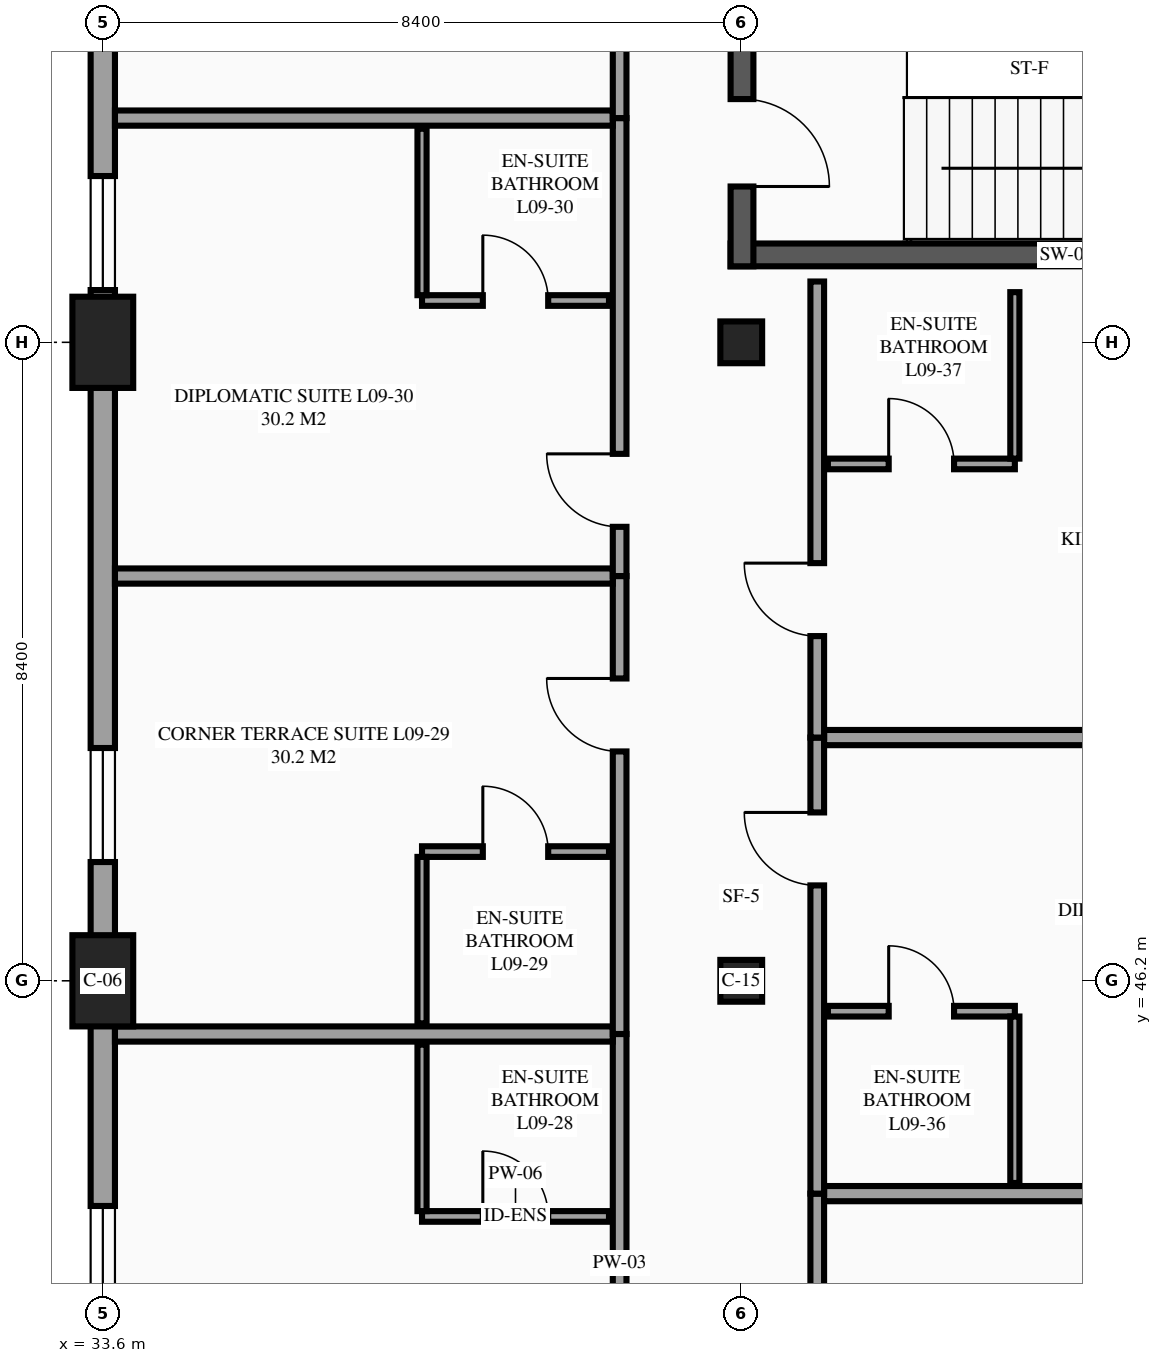
"""IFC4 building model, lengths in metres.
Left out: names, types, materials, properties, quantities, classifications, styles, units other than length and angle.
Written with IfcOpenShell. Run it as: python <this file> out.ifc"""

import sys

from ifc_helpers import new_model, si_unit, direction, frame, frame_2d, origin, origin_2d, place, context, subcontext, project, spatial, rectangle, extrude, element, fill, save


model = new_model("IFC4")
c1 = context("Model", 3, precision=1e-05, world=origin(), true_north=direction((0.0, 1.0)))
c2 = subcontext(c1, "Body", "Model", "MODEL_VIEW")
j1 = project(units=[si_unit("LENGTHUNIT", "METRE"), si_unit("PLANEANGLEUNIT", "RADIAN")], contexts=[c1])
p1 = place(None, origin())
s1 = spatial("IfcSite", under=j1, at=p1, CompositionType="ELEMENT")
p2 = place(p1, origin())
s2 = spatial("IfcBuilding", under=s1, at=p2, CompositionType="ELEMENT")
p3 = place(p2, frame((0.0, 0.0, 36.3)))
s3 = spatial("IfcBuildingStorey", under=s2, at=p3, CompositionType="ELEMENT", Elevation=36.3)
for number, where, z_axis, x_axis in (
    (1, (33.6, 46.2, 0.0), (0.0, 0.0, 1.0), (1.0, 0.0, 0.0)),
    (2, (33.6, 54.6, 0.0), (0.0, 0.0, 1.0), (1.0, 0.0, 0.0)),
):
    element("IfcColumn", number, at=place(p3, frame(where, z_axis=z_axis, x_axis=x_axis)), inside=s3, PredefinedType="COLUMN", context=c2, shape_type="SweptSolid", body=[
        extrude(rectangle(XDim=0.8, YDim=1.2, at=origin_2d()), origin(), (0.0, 0.0, 1.0), 3.6),
    ])
for number, where, z_axis, x_axis in (
    (3, (42.0, 46.2, 0.0), (0.0, 0.0, 1.0), (1.0, 0.0, 0.0)),
    (4, (42.0, 54.6, 0.0), (0.0, 0.0, 1.0), (1.0, 0.0, 0.0)),
):
    element("IfcColumn", number, at=place(p3, frame(where, z_axis=z_axis, x_axis=x_axis)), inside=s3, PredefinedType="COLUMN", context=c2, shape_type="SweptSolid", body=[
        extrude(rectangle(XDim=0.55, YDim=0.55, at=origin_2d()), origin(), (0.0, 0.0, 1.0), 3.6),
    ])
p4 = place(p3, frame((33.6, 63.0, 0.0), z_axis=(0.0, 0.0, 1.0), x_axis=(0.0, -1.0, 0.0)))
e5 = element("IfcWall", 5, at=p4, inside=s3, PredefinedType="STANDARD", context=c2, shape_type="SweptSolid", body=[
    extrude(rectangle(XDim=25.2, YDim=0.32, at=frame_2d((12.6, 0.0))), origin(), (0.0, 0.0, 1.0), 2.63),
])
p5 = place(p4, frame((19.762, 0.0, 0.85)))
e6 = element("IfcOpeningElement", 6, at=p5, cuts=e5, PredefinedType="OPENING", context=c2, shape_type="SweptSolid", body=[
    extrude(rectangle(XDim=1.5, YDim=1.5, at=frame_2d((0.75, 0.75))), frame((0.0, 0.17, 0.0), z_axis=(0.0, -1.0, 0.0), x_axis=(1.0, 0.0, 0.0)), (0.0, 0.0, 1.0), 0.34),
])
p6 = place(p4, frame((13.738, 0.0, 0.85)))
e7 = element("IfcOpeningElement", 7, at=p6, cuts=e5, PredefinedType="OPENING", context=c2, shape_type="SweptSolid", body=[
    extrude(rectangle(XDim=1.5, YDim=1.5, at=frame_2d((0.75, 0.75))), frame((0.0, 0.17, 0.0), z_axis=(0.0, -1.0, 0.0), x_axis=(1.0, 0.0, 0.0)), (0.0, 0.0, 1.0), 0.34),
])
p7 = place(p4, frame((6.212, 0.0, 0.85)))
e8 = element("IfcOpeningElement", 8, at=p7, cuts=e5, PredefinedType="OPENING", context=c2, shape_type="SweptSolid", body=[
    extrude(rectangle(XDim=1.5, YDim=1.5, at=frame_2d((0.75, 0.75))), frame((0.0, 0.17, 0.0), z_axis=(0.0, -1.0, 0.0), x_axis=(1.0, 0.0, 0.0)), (0.0, 0.0, 1.0), 0.34),
])
p8 = place(p4, frame((1.688, 0.0, 0.85)))
e9 = element("IfcOpeningElement", 9, at=p8, cuts=e5, PredefinedType="OPENING", context=c2, shape_type="SweptSolid", body=[
    extrude(rectangle(XDim=1.5, YDim=1.5, at=frame_2d((0.75, 0.75))), frame((0.0, 0.17, 0.0), z_axis=(0.0, -1.0, 0.0), x_axis=(1.0, 0.0, 0.0)), (0.0, 0.0, 1.0), 0.34),
])
p9 = place(p3, frame((41.86, 55.75, 0.0), z_axis=(0.0, 0.0, 1.0), x_axis=(1.0, 0.0, 0.0)))
e10 = element("IfcWall", 10, at=p9, inside=s3, PredefinedType="SHEAR", context=c2, shape_type="SweptSolid", body=[
    extrude(rectangle(XDim=8.84, YDim=0.3, at=frame_2d((4.42, 0.0))), origin(), (0.0, 0.0, 1.0), 3.6),
])
p10 = place(p3, frame((42.01, 60.8, 0.0), z_axis=(0.0, 0.0, 1.0), x_axis=(0.0, -1.0, 0.0)))
e11 = element("IfcWall", 11, at=p10, inside=s3, PredefinedType="SHEAR", context=c2, shape_type="SweptSolid", body=[
    extrude(rectangle(XDim=5.2, YDim=0.3, at=frame_2d((2.6, 0.0))), origin(), (0.0, 0.0, 1.0), 3.6),
])
p11 = place(p10, frame((3.0, 0.0, 0.0)))
e12 = element("IfcOpeningElement", 12, at=p11, cuts=e11, PredefinedType="OPENING", context=c2, shape_type="SweptSolid", body=[
    extrude(rectangle(XDim=1.15, YDim=2.15, at=frame_2d((0.575, 1.075))), frame((0.0, 0.16, 0.0), z_axis=(0.0, -1.0, 0.0), x_axis=(1.0, 0.0, 0.0)), (0.0, 0.0, 1.0), 0.32),
])
p12 = place(p3, frame((40.4, 39.475, 0.0), z_axis=(0.0, 0.0, 1.0), x_axis=(0.0, 1.0, 0.0)))
e13 = element("IfcWall", 13, at=p12, inside=s3, PredefinedType="PARTITIONING", context=c2, shape_type="SweptSolid", body=[
    extrude(rectangle(XDim=6.025, YDim=0.18, at=frame_2d((3.012, 0.0))), origin(), (0.0, 0.0, 1.0), 3.375),
])
p13 = place(p12, frame((1.347, 0.0, 0.0)))
e14 = element("IfcOpeningElement", 14, at=p13, cuts=e13, PredefinedType="OPENING", context=c2, shape_type="SweptSolid", body=[
    extrude(rectangle(XDim=0.96, YDim=2.15, at=frame_2d((0.48, 1.075))), frame((0.0, 0.1, 0.0), z_axis=(0.0, -1.0, 0.0), x_axis=(1.0, 0.0, 0.0)), (0.0, 0.0, 1.0), 0.2),
])
p14 = place(p3, frame((33.76, 45.5, 0.0), z_axis=(0.0, 0.0, 1.0), x_axis=(1.0, 0.0, 0.0)))
e15 = element("IfcWall", 15, at=p14, inside=s3, PredefinedType="PARTITIONING", context=c2, shape_type="SweptSolid", body=[
    extrude(rectangle(XDim=6.55, YDim=0.2, at=frame_2d((3.275, 0.0))), origin(), (0.0, 0.0, 1.0), 3.375),
])
p15 = place(p3, frame((37.8, 43.1, 0.0), z_axis=(0.0, 0.0, 1.0), x_axis=(1.0, 0.0, 0.0)))
e16 = element("IfcWall", 16, at=p15, inside=s3, PredefinedType="PARTITIONING", context=c2, shape_type="SweptSolid", body=[
    extrude(rectangle(XDim=2.46, YDim=0.14, at=frame_2d((1.23, 0.0))), origin(), (0.0, 0.0, 1.0), 3.375),
])
p16 = place(p15, frame((0.8, 0.0, 0.0)))
e17 = element("IfcOpeningElement", 17, at=p16, cuts=e16, PredefinedType="OPENING", context=c2, shape_type="SweptSolid", body=[
    extrude(rectangle(XDim=0.86, YDim=2.1, at=frame_2d((0.43, 1.05))), frame((0.0, 0.08, 0.0), z_axis=(0.0, -1.0, 0.0), x_axis=(1.0, 0.0, 0.0)), (0.0, 0.0, 1.0), 0.16),
])
p17 = place(p3, frame((37.8, 43.17, 0.0), z_axis=(0.0, 0.0, 1.0), x_axis=(0.0, 1.0, 0.0)))
e18 = element("IfcWall", 18, at=p17, inside=s3, PredefinedType="PARTITIONING", context=c2, shape_type="SweptSolid", body=[
    extrude(rectangle(XDim=2.19, YDim=0.12, at=frame_2d((1.095, 0.0))), origin(), (0.0, 0.0, 1.0), 3.375),
])
p18 = place(p3, frame((40.4, 45.5, 0.0), z_axis=(0.0, 0.0, 1.0), x_axis=(0.0, 1.0, 0.0)))
e19 = element("IfcWall", 19, at=p18, inside=s3, PredefinedType="PARTITIONING", context=c2, shape_type="SweptSolid", body=[
    extrude(rectangle(XDim=6.025, YDim=0.18, at=frame_2d((3.012, 0.0))), origin(), (0.0, 0.0, 1.0), 3.375),
])
p19 = place(p18, frame((3.718, 0.0, 0.0)))
e20 = element("IfcOpeningElement", 20, at=p19, cuts=e19, PredefinedType="OPENING", context=c2, shape_type="SweptSolid", body=[
    extrude(rectangle(XDim=0.96, YDim=2.15, at=frame_2d((0.48, 1.075))), frame((0.0, 0.1, 0.0), z_axis=(0.0, -1.0, 0.0), x_axis=(1.0, 0.0, 0.0)), (0.0, 0.0, 1.0), 0.2),
])
p20 = place(p3, frame((33.76, 51.525, 0.0), z_axis=(0.0, 0.0, 1.0), x_axis=(1.0, 0.0, 0.0)))
e21 = element("IfcWall", 21, at=p20, inside=s3, PredefinedType="PARTITIONING", context=c2, shape_type="SweptSolid", body=[
    extrude(rectangle(XDim=6.55, YDim=0.2, at=frame_2d((3.275, 0.0))), origin(), (0.0, 0.0, 1.0), 3.375),
])
p21 = place(p3, frame((37.8, 47.9, 0.0), z_axis=(0.0, 0.0, 1.0), x_axis=(1.0, 0.0, 0.0)))
e22 = element("IfcWall", 22, at=p21, inside=s3, PredefinedType="PARTITIONING", context=c2, shape_type="SweptSolid", body=[
    extrude(rectangle(XDim=2.46, YDim=0.14, at=frame_2d((1.23, 0.0))), origin(), (0.0, 0.0, 1.0), 3.375),
])
p22 = place(p21, frame((0.8, 0.0, 0.0)))
e23 = element("IfcOpeningElement", 23, at=p22, cuts=e22, PredefinedType="OPENING", context=c2, shape_type="SweptSolid", body=[
    extrude(rectangle(XDim=0.86, YDim=2.1, at=frame_2d((0.43, 1.05))), frame((0.0, 0.08, 0.0), z_axis=(0.0, -1.0, 0.0), x_axis=(1.0, 0.0, 0.0)), (0.0, 0.0, 1.0), 0.16),
])
p23 = place(p3, frame((37.8, 45.64, 0.0), z_axis=(0.0, 0.0, 1.0), x_axis=(0.0, 1.0, 0.0)))
e24 = element("IfcWall", 24, at=p23, inside=s3, PredefinedType="PARTITIONING", context=c2, shape_type="SweptSolid", body=[
    extrude(rectangle(XDim=2.19, YDim=0.12, at=frame_2d((1.095, 0.0))), origin(), (0.0, 0.0, 1.0), 3.375),
])
p24 = place(p3, frame((40.4, 51.525, 0.0), z_axis=(0.0, 0.0, 1.0), x_axis=(0.0, 1.0, 0.0)))
e25 = element("IfcWall", 25, at=p24, inside=s3, PredefinedType="PARTITIONING", context=c2, shape_type="SweptSolid", body=[
    extrude(rectangle(XDim=6.025, YDim=0.18, at=frame_2d((3.013, 0.0))), origin(), (0.0, 0.0, 1.0), 3.375),
])
p25 = place(p24, frame((0.647, 0.0, 0.0)))
e26 = element("IfcOpeningElement", 26, at=p25, cuts=e25, PredefinedType="OPENING", context=c2, shape_type="SweptSolid", body=[
    extrude(rectangle(XDim=0.96, YDim=2.15, at=frame_2d((0.48, 1.075))), frame((0.0, 0.1, 0.0), z_axis=(0.0, -1.0, 0.0), x_axis=(1.0, 0.0, 0.0)), (0.0, 0.0, 1.0), 0.2),
])
p26 = place(p3, frame((33.76, 57.55, 0.0), z_axis=(0.0, 0.0, 1.0), x_axis=(1.0, 0.0, 0.0)))
e27 = element("IfcWall", 27, at=p26, inside=s3, PredefinedType="PARTITIONING", context=c2, shape_type="SweptSolid", body=[
    extrude(rectangle(XDim=6.55, YDim=0.2, at=frame_2d((3.275, 0.0))), origin(), (0.0, 0.0, 1.0), 3.375),
])
p27 = place(p3, frame((37.8, 55.15, 0.0), z_axis=(0.0, 0.0, 1.0), x_axis=(1.0, 0.0, 0.0)))
e28 = element("IfcWall", 28, at=p27, inside=s3, PredefinedType="PARTITIONING", context=c2, shape_type="SweptSolid", body=[
    extrude(rectangle(XDim=2.46, YDim=0.14, at=frame_2d((1.23, 0.0))), origin(), (0.0, 0.0, 1.0), 3.375),
])
p28 = place(p27, frame((0.8, 0.0, 0.0)))
e29 = element("IfcOpeningElement", 29, at=p28, cuts=e28, PredefinedType="OPENING", context=c2, shape_type="SweptSolid", body=[
    extrude(rectangle(XDim=0.86, YDim=2.1, at=frame_2d((0.43, 1.05))), frame((0.0, 0.08, 0.0), z_axis=(0.0, -1.0, 0.0), x_axis=(1.0, 0.0, 0.0)), (0.0, 0.0, 1.0), 0.16),
])
p29 = place(p3, frame((37.8, 55.22, 0.0), z_axis=(0.0, 0.0, 1.0), x_axis=(0.0, 1.0, 0.0)))
e30 = element("IfcWall", 30, at=p29, inside=s3, PredefinedType="PARTITIONING", context=c2, shape_type="SweptSolid", body=[
    extrude(rectangle(XDim=2.19, YDim=0.12, at=frame_2d((1.095, 0.0))), origin(), (0.0, 0.0, 1.0), 3.375),
])
p30 = place(p3, frame((40.4, 57.55, 0.0), z_axis=(0.0, 0.0, 1.0), x_axis=(0.0, 1.0, 0.0)))
e31 = element("IfcWall", 31, at=p30, inside=s3, PredefinedType="PARTITIONING", context=c2, shape_type="SweptSolid", body=[
    extrude(rectangle(XDim=6.025, YDim=0.18, at=frame_2d((3.012, 0.0))), origin(), (0.0, 0.0, 1.0), 3.375),
])
p31 = place(p30, frame((1.347, 0.0, 0.0)))
e32 = element("IfcOpeningElement", 32, at=p31, cuts=e31, PredefinedType="OPENING", context=c2, shape_type="SweptSolid", body=[
    extrude(rectangle(XDim=0.96, YDim=2.15, at=frame_2d((0.48, 1.075))), frame((0.0, 0.1, 0.0), z_axis=(0.0, -1.0, 0.0), x_axis=(1.0, 0.0, 0.0)), (0.0, 0.0, 1.0), 0.2),
])
p32 = place(p3, frame((43.0, 37.4, 0.0), z_axis=(0.0, 0.0, 1.0), x_axis=(0.0, 1.0, 0.0)))
e33 = element("IfcWall", 33, at=p32, inside=s3, PredefinedType="PARTITIONING", context=c2, shape_type="SweptSolid", body=[
    extrude(rectangle(XDim=6.0, YDim=0.18, at=frame_2d((3.0, 0.0))), origin(), (0.0, 0.0, 1.0), 3.375),
])
p33 = place(p32, frame((3.705, 0.0, 0.0)))
e34 = element("IfcOpeningElement", 34, at=p33, cuts=e33, PredefinedType="OPENING", context=c2, shape_type="SweptSolid", body=[
    extrude(rectangle(XDim=0.96, YDim=2.15, at=frame_2d((0.48, 1.075))), frame((0.0, 0.1, 0.0), z_axis=(0.0, -1.0, 0.0), x_axis=(1.0, 0.0, 0.0)), (0.0, 0.0, 1.0), 0.2),
])
p34 = place(p3, frame((43.09, 43.4, 0.0), z_axis=(0.0, 0.0, 1.0), x_axis=(1.0, 0.0, 0.0)))
e35 = element("IfcWall", 35, at=p34, inside=s3, PredefinedType="PARTITIONING", context=c2, shape_type="SweptSolid", body=[
    extrude(rectangle(XDim=7.15, YDim=0.2, at=frame_2d((3.575, 0.0))), origin(), (0.0, 0.0, 1.0), 3.375),
])
p35 = place(p3, frame((43.0, 43.4, 0.0), z_axis=(0.0, 0.0, 1.0), x_axis=(0.0, 1.0, 0.0)))
e36 = element("IfcWall", 36, at=p35, inside=s3, PredefinedType="PARTITIONING", context=c2, shape_type="SweptSolid", body=[
    extrude(rectangle(XDim=6.0, YDim=0.18, at=frame_2d((3.0, 0.0))), origin(), (0.0, 0.0, 1.0), 3.375),
])
p36 = place(p35, frame((4.055, 0.0, 0.0)))
e37 = element("IfcOpeningElement", 37, at=p36, cuts=e36, PredefinedType="OPENING", context=c2, shape_type="SweptSolid", body=[
    extrude(rectangle(XDim=0.96, YDim=2.15, at=frame_2d((0.48, 1.075))), frame((0.0, 0.1, 0.0), z_axis=(0.0, -1.0, 0.0), x_axis=(1.0, 0.0, 0.0)), (0.0, 0.0, 1.0), 0.2),
])
p37 = place(p3, frame((43.09, 49.4, 0.0), z_axis=(0.0, 0.0, 1.0), x_axis=(1.0, 0.0, 0.0)))
e38 = element("IfcWall", 38, at=p37, inside=s3, PredefinedType="PARTITIONING", context=c2, shape_type="SweptSolid", body=[
    extrude(rectangle(XDim=7.15, YDim=0.2, at=frame_2d((3.575, 0.0))), origin(), (0.0, 0.0, 1.0), 3.375),
])
p38 = place(p3, frame((43.14, 45.8, 0.0), z_axis=(0.0, 0.0, 1.0), x_axis=(1.0, 0.0, 0.0)))
e39 = element("IfcWall", 39, at=p38, inside=s3, PredefinedType="PARTITIONING", context=c2, shape_type="SweptSolid", body=[
    extrude(rectangle(XDim=2.46, YDim=0.14, at=frame_2d((1.23, 0.0))), origin(), (0.0, 0.0, 1.0), 3.375),
])
p39 = place(p38, frame((0.8, 0.0, 0.0)))
e40 = element("IfcOpeningElement", 40, at=p39, cuts=e39, PredefinedType="OPENING", context=c2, shape_type="SweptSolid", body=[
    extrude(rectangle(XDim=0.86, YDim=2.1, at=frame_2d((0.43, 1.05))), frame((0.0, 0.08, 0.0), z_axis=(0.0, -1.0, 0.0), x_axis=(1.0, 0.0, 0.0)), (0.0, 0.0, 1.0), 0.16),
])
p40 = place(p3, frame((45.6, 43.54, 0.0), z_axis=(0.0, 0.0, 1.0), x_axis=(0.0, 1.0, 0.0)))
e41 = element("IfcWall", 41, at=p40, inside=s3, PredefinedType="PARTITIONING", context=c2, shape_type="SweptSolid", body=[
    extrude(rectangle(XDim=2.19, YDim=0.12, at=frame_2d((1.095, 0.0))), origin(), (0.0, 0.0, 1.0), 3.375),
])
p41 = place(p3, frame((43.0, 49.4, 0.0), z_axis=(0.0, 0.0, 1.0), x_axis=(0.0, 1.0, 0.0)))
e42 = element("IfcWall", 42, at=p41, inside=s3, PredefinedType="PARTITIONING", context=c2, shape_type="SweptSolid", body=[
    extrude(rectangle(XDim=6.0, YDim=0.18, at=frame_2d((3.0, 0.0))), origin(), (0.0, 0.0, 1.0), 3.375),
])
p42 = place(p41, frame((1.335, 0.0, 0.0)))
e43 = element("IfcOpeningElement", 43, at=p42, cuts=e42, PredefinedType="OPENING", context=c2, shape_type="SweptSolid", body=[
    extrude(rectangle(XDim=0.96, YDim=2.15, at=frame_2d((0.48, 1.075))), frame((0.0, 0.1, 0.0), z_axis=(0.0, -1.0, 0.0), x_axis=(1.0, 0.0, 0.0)), (0.0, 0.0, 1.0), 0.2),
])
p43 = place(p3, frame((43.14, 53.0, 0.0), z_axis=(0.0, 0.0, 1.0), x_axis=(1.0, 0.0, 0.0)))
e44 = element("IfcWall", 44, at=p43, inside=s3, PredefinedType="PARTITIONING", context=c2, shape_type="SweptSolid", body=[
    extrude(rectangle(XDim=2.46, YDim=0.14, at=frame_2d((1.23, 0.0))), origin(), (0.0, 0.0, 1.0), 3.375),
])
p44 = place(p43, frame((0.8, 0.0, 0.0)))
e45 = element("IfcOpeningElement", 45, at=p44, cuts=e44, PredefinedType="OPENING", context=c2, shape_type="SweptSolid", body=[
    extrude(rectangle(XDim=0.86, YDim=2.1, at=frame_2d((0.43, 1.05))), frame((0.0, 0.08, 0.0), z_axis=(0.0, -1.0, 0.0), x_axis=(1.0, 0.0, 0.0)), (0.0, 0.0, 1.0), 0.16),
])
p45 = place(p3, frame((45.6, 53.07, 0.0), z_axis=(0.0, 0.0, 1.0), x_axis=(0.0, 1.0, 0.0)))
e46 = element("IfcWall", 46, at=p45, inside=s3, PredefinedType="PARTITIONING", context=c2, shape_type="SweptSolid", body=[
    extrude(rectangle(XDim=2.19, YDim=0.12, at=frame_2d((1.095, 0.0))), origin(), (0.0, 0.0, 1.0), 3.375),
])
p46 = place(p5, origin())
e47 = element("IfcWindow", 47, at=p46, inside=s3, PartitioningType="SINGLE_PANEL", PredefinedType="WINDOW", context=c2, shape_type="SweptSolid", body=[
    extrude(rectangle(XDim=1.5, YDim=1.5, at=frame_2d((0.75, 0.75))), frame((0.0, 0.03, 0.0), z_axis=(0.0, -1.0, 0.0), x_axis=(1.0, 0.0, 0.0)), (0.0, 0.0, 1.0), 0.06),
])
fill(e6, e47)
p47 = place(p6, origin())
e48 = element("IfcWindow", 48, at=p47, inside=s3, PartitioningType="SINGLE_PANEL", PredefinedType="WINDOW", context=c2, shape_type="SweptSolid", body=[
    extrude(rectangle(XDim=1.5, YDim=1.5, at=frame_2d((0.75, 0.75))), frame((0.0, 0.03, 0.0), z_axis=(0.0, -1.0, 0.0), x_axis=(1.0, 0.0, 0.0)), (0.0, 0.0, 1.0), 0.06),
])
fill(e7, e48)
p48 = place(p7, origin())
e49 = element("IfcWindow", 49, at=p48, inside=s3, PartitioningType="SINGLE_PANEL", PredefinedType="WINDOW", context=c2, shape_type="SweptSolid", body=[
    extrude(rectangle(XDim=1.5, YDim=1.5, at=frame_2d((0.75, 0.75))), frame((0.0, 0.03, 0.0), z_axis=(0.0, -1.0, 0.0), x_axis=(1.0, 0.0, 0.0)), (0.0, 0.0, 1.0), 0.06),
])
fill(e8, e49)
p49 = place(p11, origin())
e50 = element("IfcDoor", 50, at=p49, inside=s3, OperationType="SINGLE_SWING_RIGHT", PredefinedType="DOOR", context=c2, shape_type="SweptSolid", body=[
    extrude(rectangle(XDim=1.15, YDim=2.15, at=frame_2d((0.575, 1.075))), frame((0.0, 0.025, 0.0), z_axis=(0.0, -1.0, 0.0), x_axis=(1.0, 0.0, 0.0)), (0.0, 0.0, 1.0), 0.05),
])
fill(e12, e50)
p50 = place(p16, origin())
e51 = element("IfcDoor", 51, at=p50, inside=s3, OperationType="SINGLE_SWING_LEFT", PredefinedType="DOOR", context=c2, shape_type="SweptSolid", body=[
    extrude(rectangle(XDim=0.86, YDim=2.1, at=frame_2d((0.43, 1.05))), frame((0.0, 0.025, 0.0), z_axis=(0.0, -1.0, 0.0), x_axis=(1.0, 0.0, 0.0)), (0.0, 0.0, 1.0), 0.05),
])
fill(e17, e51)
p51 = place(p19, origin())
e52 = element("IfcDoor", 52, at=p51, inside=s3, OperationType="SINGLE_SWING_RIGHT", PredefinedType="DOOR", context=c2, shape_type="SweptSolid", body=[
    extrude(rectangle(XDim=0.96, YDim=2.15, at=frame_2d((0.48, 1.075))), frame((0.0, 0.025, 0.0), z_axis=(0.0, -1.0, 0.0), x_axis=(1.0, 0.0, 0.0)), (0.0, 0.0, 1.0), 0.05),
])
fill(e20, e52)
p52 = place(p22, origin())
e53 = element("IfcDoor", 53, at=p52, inside=s3, OperationType="SINGLE_SWING_LEFT", PredefinedType="DOOR", context=c2, shape_type="SweptSolid", body=[
    extrude(rectangle(XDim=0.86, YDim=2.1, at=frame_2d((0.43, 1.05))), frame((0.0, 0.025, 0.0), z_axis=(0.0, -1.0, 0.0), x_axis=(1.0, 0.0, 0.0)), (0.0, 0.0, 1.0), 0.05),
])
fill(e23, e53)
p53 = place(p25, origin())
e54 = element("IfcDoor", 54, at=p53, inside=s3, OperationType="SINGLE_SWING_RIGHT", PredefinedType="DOOR", context=c2, shape_type="SweptSolid", body=[
    extrude(rectangle(XDim=0.96, YDim=2.15, at=frame_2d((0.48, 1.075))), frame((0.0, 0.025, 0.0), z_axis=(0.0, -1.0, 0.0), x_axis=(1.0, 0.0, 0.0)), (0.0, 0.0, 1.0), 0.05),
])
fill(e26, e54)
p54 = place(p28, origin())
e55 = element("IfcDoor", 55, at=p54, inside=s3, OperationType="SINGLE_SWING_LEFT", PredefinedType="DOOR", context=c2, shape_type="SweptSolid", body=[
    extrude(rectangle(XDim=0.86, YDim=2.1, at=frame_2d((0.43, 1.05))), frame((0.0, 0.025, 0.0), z_axis=(0.0, -1.0, 0.0), x_axis=(1.0, 0.0, 0.0)), (0.0, 0.0, 1.0), 0.05),
])
fill(e29, e55)
p55 = place(p36, origin())
e56 = element("IfcDoor", 56, at=p55, inside=s3, OperationType="SINGLE_SWING_RIGHT", PredefinedType="DOOR", context=c2, shape_type="SweptSolid", body=[
    extrude(rectangle(XDim=0.96, YDim=2.15, at=frame_2d((0.48, 1.075))), frame((0.0, 0.025, 0.0), z_axis=(0.0, -1.0, 0.0), x_axis=(1.0, 0.0, 0.0)), (0.0, 0.0, 1.0), 0.05),
])
fill(e37, e56)
p56 = place(p39, origin())
e57 = element("IfcDoor", 57, at=p56, inside=s3, OperationType="SINGLE_SWING_LEFT", PredefinedType="DOOR", context=c2, shape_type="SweptSolid", body=[
    extrude(rectangle(XDim=0.86, YDim=2.1, at=frame_2d((0.43, 1.05))), frame((0.0, 0.025, 0.0), z_axis=(0.0, -1.0, 0.0), x_axis=(1.0, 0.0, 0.0)), (0.0, 0.0, 1.0), 0.05),
])
fill(e40, e57)
p57 = place(p42, origin())
e58 = element("IfcDoor", 58, at=p57, inside=s3, OperationType="SINGLE_SWING_RIGHT", PredefinedType="DOOR", context=c2, shape_type="SweptSolid", body=[
    extrude(rectangle(XDim=0.96, YDim=2.15, at=frame_2d((0.48, 1.075))), frame((0.0, 0.025, 0.0), z_axis=(0.0, -1.0, 0.0), x_axis=(1.0, 0.0, 0.0)), (0.0, 0.0, 1.0), 0.05),
])
fill(e43, e58)
p58 = place(p44, origin())
e59 = element("IfcDoor", 59, at=p58, inside=s3, OperationType="SINGLE_SWING_LEFT", PredefinedType="DOOR", context=c2, shape_type="SweptSolid", body=[
    extrude(rectangle(XDim=0.86, YDim=2.1, at=frame_2d((0.43, 1.05))), frame((0.0, 0.025, 0.0), z_axis=(0.0, -1.0, 0.0), x_axis=(1.0, 0.0, 0.0)), (0.0, 0.0, 1.0), 0.05),
])
fill(e45, e59)
save(model, sys.argv[1])
